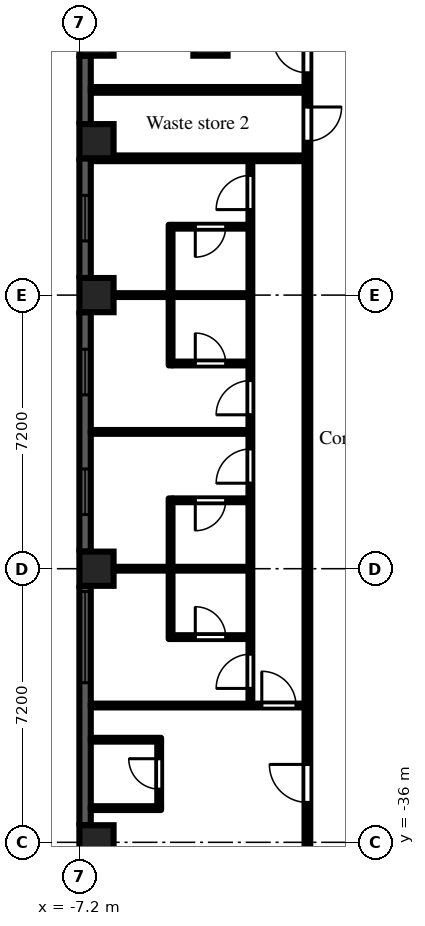
"""IFC4 building model, lengths in metres.
Left out: names, types, materials, properties, quantities, classifications, styles, units other than length and angle.
Written with IfcOpenShell. Run it as: python <this file> out.ifc"""

import sys

from ifc_helpers import new_model, si_unit, direction, frame, frame_2d, origin, origin_2d, place, context, subcontext, project, spatial, rectangle, extrude, element, fill, save


model = new_model("IFC4")
c1 = context("Model", 3, precision=1e-05, world=origin(), true_north=direction((0.0, 1.0)))
c2 = subcontext(c1, "Body", "Model", "MODEL_VIEW")
j1 = project(units=[si_unit("LENGTHUNIT", "METRE"), si_unit("PLANEANGLEUNIT", "RADIAN")], contexts=[c1])
p1 = place(None, origin())
s1 = spatial("IfcSite", under=j1, at=p1, CompositionType="ELEMENT")
p2 = place(p1, origin())
s2 = spatial("IfcBuilding", under=s1, at=p2, CompositionType="ELEMENT")
p3 = place(p2, frame((0.0, 0.0, 102.9)))
s3 = spatial("IfcBuildingStorey", under=s2, at=p3, CompositionType="ELEMENT", Elevation=102.9)
for number, where, z_axis, x_axis in (
    (1, (-6.75, -36.0, 0.0), (0.0, 0.0, 1.0), (1.0, 0.0, 0.0)),
    (2, (-6.75, -28.8, 0.0), (0.0, 0.0, 1.0), (1.0, 0.0, 0.0)),
    (3, (-6.75, -21.6, 0.0), (0.0, 0.0, 1.0), (1.0, 0.0, 0.0)),
    (4, (-6.75, -17.55, 0.0), (0.0, 0.0, 1.0), (1.0, 0.0, 0.0)),
    (5, (-6.75, -14.85, 0.0), (0.0, 0.0, 1.0), (1.0, 0.0, 0.0)),
    (6, (-3.75, -14.85, 0.0), (0.0, 0.0, 1.0), (1.0, 0.0, 0.0)),
):
    element("IfcColumn", number, at=place(p3, frame(where, z_axis=z_axis, x_axis=x_axis)), inside=s3, PredefinedType="COLUMN", context=c2, shape_type="SweptSolid", body=[
        extrude(rectangle(XDim=0.9, YDim=0.9, at=origin_2d()), origin(), (0.0, 0.0, 1.0), 3.0),
    ])
p4 = place(p3, frame((-7.05, -15.3, 0.0), z_axis=(0.0, 0.0, 1.0), x_axis=(0.0, -1.0, 0.0)))
e7 = element("IfcWall", 7, at=p4, inside=s3, PredefinedType="SOLIDWALL", context=c2, shape_type="SweptSolid", body=[
    extrude(rectangle(XDim=1.8, YDim=0.3, at=frame_2d((0.9, 0.0))), origin(), (0.0, 0.0, 1.0), 2.1),
])
p5 = place(p3, frame((-7.05, -18.0, 0.0), z_axis=(0.0, 0.0, 1.0), x_axis=(0.0, -1.0, 0.0)))
e8 = element("IfcWall", 8, at=p5, inside=s3, PredefinedType="SOLIDWALL", context=c2, shape_type="SweptSolid", body=[
    extrude(rectangle(XDim=3.15, YDim=0.3, at=frame_2d((1.575, 0.0))), origin(), (0.0, 0.0, 1.0), 2.1),
])
p6 = place(p5, frame((0.975, 0.0, 0.2)))
e9 = element("IfcOpeningElement", 9, at=p6, cuts=e8, PredefinedType="OPENING", context=c2, shape_type="SweptSolid", body=[
    extrude(rectangle(XDim=1.2, YDim=1.85, at=frame_2d((0.6, 0.925))), frame((0.0, 0.16, 0.0), z_axis=(0.0, -1.0, 0.0), x_axis=(1.0, 0.0, 0.0)), (0.0, 0.0, 1.0), 0.32),
])
p7 = place(p3, frame((-7.05, -22.05, 0.0), z_axis=(0.0, 0.0, 1.0), x_axis=(0.0, -1.0, 0.0)))
e10 = element("IfcWall", 10, at=p7, inside=s3, PredefinedType="SOLIDWALL", context=c2, shape_type="SweptSolid", body=[
    extrude(rectangle(XDim=6.3, YDim=0.3, at=frame_2d((3.15, 0.0))), origin(), (0.0, 0.0, 1.0), 2.1),
])
p8 = place(p7, frame((0.975, 0.0, 0.2)))
e11 = element("IfcOpeningElement", 11, at=p8, cuts=e10, PredefinedType="OPENING", context=c2, shape_type="SweptSolid", body=[
    extrude(rectangle(XDim=1.2, YDim=1.85, at=frame_2d((0.6, 0.925))), frame((0.0, 0.16, 0.0), z_axis=(0.0, -1.0, 0.0), x_axis=(1.0, 0.0, 0.0)), (0.0, 0.0, 1.0), 0.32),
])
p9 = place(p7, frame((4.125, 0.0, 0.2)))
e12 = element("IfcOpeningElement", 12, at=p9, cuts=e10, PredefinedType="OPENING", context=c2, shape_type="SweptSolid", body=[
    extrude(rectangle(XDim=1.2, YDim=1.85, at=frame_2d((0.6, 0.925))), frame((0.0, 0.16, 0.0), z_axis=(0.0, -1.0, 0.0), x_axis=(1.0, 0.0, 0.0)), (0.0, 0.0, 1.0), 0.32),
])
p10 = place(p3, frame((-7.05, -29.25, 0.0), z_axis=(0.0, 0.0, 1.0), x_axis=(0.0, -1.0, 0.0)))
e13 = element("IfcWall", 13, at=p10, inside=s3, PredefinedType="SOLIDWALL", context=c2, shape_type="SweptSolid", body=[
    extrude(rectangle(XDim=6.3, YDim=0.3, at=frame_2d((3.15, 0.0))), origin(), (0.0, 0.0, 1.0), 2.1),
])
p11 = place(p10, frame((0.15, 0.0, 0.2)))
e14 = element("IfcOpeningElement", 14, at=p11, cuts=e13, PredefinedType="OPENING", context=c2, shape_type="SweptSolid", body=[
    extrude(rectangle(XDim=2.4, YDim=1.85, at=frame_2d((1.2, 0.925))), frame((0.0, 0.16, 0.0), z_axis=(0.0, -1.0, 0.0), x_axis=(1.0, 0.0, 0.0)), (0.0, 0.0, 1.0), 0.32),
])
for number, where, z_axis, x_axis in (
    (15, (-6.9, -35.1, 0.0), (0.0, 0.0, 1.0), (1.0, 0.0, 0.0)),
    (16, (-6.9, -33.3, 0.0), (0.0, 0.0, 1.0), (1.0, 0.0, 0.0)),
):
    element("IfcWall", number, at=place(p3, frame(where, z_axis=z_axis, x_axis=x_axis)), inside=s3, PredefinedType="PARTITIONING", context=c2, shape_type="SweptSolid", body=[
        extrude(rectangle(XDim=1.85, YDim=0.1, at=frame_2d((0.925, 0.0))), origin(), (0.0, 0.0, 1.0), 2.575),
    ])
p12 = place(p3, frame((-6.9, -32.4, 0.0), z_axis=(0.0, 0.0, 1.0), x_axis=(1.0, 0.0, 0.0)))
e17 = element("IfcWall", 17, at=p12, inside=s3, PredefinedType="PARTITIONING", context=c2, shape_type="SweptSolid", body=[
    extrude(rectangle(XDim=5.625, YDim=0.1, at=frame_2d((2.812, 0.0))), origin(), (0.0, 0.0, 1.0), 2.575),
])
p13 = place(p12, frame((4.5, 0.0, 0.0)))
e18 = element("IfcOpeningElement", 18, at=p13, cuts=e17, PredefinedType="OPENING", context=c2, shape_type="SweptSolid", body=[
    extrude(rectangle(XDim=0.9, YDim=2.1, at=frame_2d((0.45, 1.05))), frame((0.0, 0.06, 0.0), z_axis=(0.0, -1.0, 0.0), x_axis=(1.0, 0.0, 0.0)), (0.0, 0.0, 1.0), 0.12),
])
for number, where, z_axis, x_axis in (
    (19, (-6.9, -28.8, 0.0), (0.0, 0.0, 1.0), (1.0, 0.0, 0.0)),
    (20, (-6.9, -25.2, 0.0), (0.0, 0.0, 1.0), (1.0, 0.0, 0.0)),
    (21, (-6.9, -21.6, 0.0), (0.0, 0.0, 1.0), (1.0, 0.0, 0.0)),
):
    element("IfcWall", number, at=place(p3, frame(where, z_axis=z_axis, x_axis=x_axis)), inside=s3, PredefinedType="PARTITIONING", context=c2, shape_type="SweptSolid", body=[
        extrude(rectangle(XDim=4.15, YDim=0.1, at=frame_2d((2.075, 0.0))), origin(), (0.0, 0.0, 1.0), 2.575),
    ])
for number, where, z_axis, x_axis in (
    (22, (-6.9, -18.0, 0.0), (0.0, 0.0, 1.0), (1.0, 0.0, 0.0)),
    (23, (-6.9, -16.2, 0.0), (0.0, 0.0, 1.0), (1.0, 0.0, 0.0)),
):
    element("IfcWall", number, at=place(p3, frame(where, z_axis=z_axis, x_axis=x_axis)), inside=s3, PredefinedType="PARTITIONING", context=c2, shape_type="SweptSolid", body=[
        extrude(rectangle(XDim=5.625, YDim=0.15, at=frame_2d((2.812, 0.0))), origin(), (0.0, 0.0, 1.0), 2.575),
    ])
p14 = place(p3, frame((-5.1, -35.05, 0.0), z_axis=(0.0, 0.0, 1.0), x_axis=(0.0, 1.0, 0.0)))
e24 = element("IfcWall", 24, at=p14, inside=s3, PredefinedType="PARTITIONING", context=c2, shape_type="SweptSolid", body=[
    extrude(rectangle(XDim=1.7, YDim=0.1, at=frame_2d((0.85, 0.0))), origin(), (0.0, 0.0, 1.0), 2.575),
])
p15 = place(p14, frame((0.45, 0.0, 0.0)))
e25 = element("IfcOpeningElement", 25, at=p15, cuts=e24, PredefinedType="OPENING", context=c2, shape_type="SweptSolid", body=[
    extrude(rectangle(XDim=0.8, YDim=2.1, at=frame_2d((0.4, 1.05))), frame((0.0, 0.06, 0.0), z_axis=(0.0, -1.0, 0.0), x_axis=(1.0, 0.0, 0.0)), (0.0, 0.0, 1.0), 0.12),
])
p16 = place(p3, frame((-4.8, -30.65, 0.0), z_axis=(0.0, 0.0, 1.0), x_axis=(0.0, 1.0, 0.0)))
e26 = element("IfcWall", 26, at=p16, inside=s3, PredefinedType="PARTITIONING", context=c2, shape_type="SweptSolid", body=[
    extrude(rectangle(XDim=3.7, YDim=0.1, at=frame_2d((1.85, 0.0))), origin(), (0.0, 0.0, 1.0), 2.575),
])
p17 = place(p3, frame((-4.75, -30.6, 0.0), z_axis=(0.0, 0.0, 1.0), x_axis=(1.0, 0.0, 0.0)))
e27 = element("IfcWall", 27, at=p17, inside=s3, PredefinedType="PARTITIONING", context=c2, shape_type="SweptSolid", body=[
    extrude(rectangle(XDim=2.0, YDim=0.1, at=frame_2d((1.0, 0.0))), origin(), (0.0, 0.0, 1.0), 2.575),
])
p18 = place(p17, frame((0.6, 0.0, 0.0)))
e28 = element("IfcOpeningElement", 28, at=p18, cuts=e27, PredefinedType="OPENING", context=c2, shape_type="SweptSolid", body=[
    extrude(rectangle(XDim=0.8, YDim=2.1, at=frame_2d((0.4, 1.05))), frame((0.0, 0.06, 0.0), z_axis=(0.0, -1.0, 0.0), x_axis=(1.0, 0.0, 0.0)), (0.0, 0.0, 1.0), 0.12),
])
p19 = place(p3, frame((-4.75, -27.0, 0.0), z_axis=(0.0, 0.0, 1.0), x_axis=(1.0, 0.0, 0.0)))
e29 = element("IfcWall", 29, at=p19, inside=s3, PredefinedType="PARTITIONING", context=c2, shape_type="SweptSolid", body=[
    extrude(rectangle(XDim=2.0, YDim=0.1, at=frame_2d((1.0, 0.0))), origin(), (0.0, 0.0, 1.0), 2.575),
])
p20 = place(p19, frame((0.6, 0.0, 0.0)))
e30 = element("IfcOpeningElement", 30, at=p20, cuts=e29, PredefinedType="OPENING", context=c2, shape_type="SweptSolid", body=[
    extrude(rectangle(XDim=0.8, YDim=2.1, at=frame_2d((0.4, 1.05))), frame((0.0, 0.06, 0.0), z_axis=(0.0, -1.0, 0.0), x_axis=(1.0, 0.0, 0.0)), (0.0, 0.0, 1.0), 0.12),
])
p21 = place(p3, frame((-4.8, -23.45, 0.0), z_axis=(0.0, 0.0, 1.0), x_axis=(0.0, 1.0, 0.0)))
e31 = element("IfcWall", 31, at=p21, inside=s3, PredefinedType="PARTITIONING", context=c2, shape_type="SweptSolid", body=[
    extrude(rectangle(XDim=3.7, YDim=0.1, at=frame_2d((1.85, 0.0))), origin(), (0.0, 0.0, 1.0), 2.575),
])
p22 = place(p3, frame((-4.75, -23.4, 0.0), z_axis=(0.0, 0.0, 1.0), x_axis=(1.0, 0.0, 0.0)))
e32 = element("IfcWall", 32, at=p22, inside=s3, PredefinedType="PARTITIONING", context=c2, shape_type="SweptSolid", body=[
    extrude(rectangle(XDim=2.0, YDim=0.1, at=frame_2d((1.0, 0.0))), origin(), (0.0, 0.0, 1.0), 2.575),
])
p23 = place(p22, frame((0.6, 0.0, 0.0)))
e33 = element("IfcOpeningElement", 33, at=p23, cuts=e32, PredefinedType="OPENING", context=c2, shape_type="SweptSolid", body=[
    extrude(rectangle(XDim=0.8, YDim=2.1, at=frame_2d((0.4, 1.05))), frame((0.0, 0.06, 0.0), z_axis=(0.0, -1.0, 0.0), x_axis=(1.0, 0.0, 0.0)), (0.0, 0.0, 1.0), 0.12),
])
p24 = place(p3, frame((-4.75, -19.8, 0.0), z_axis=(0.0, 0.0, 1.0), x_axis=(1.0, 0.0, 0.0)))
e34 = element("IfcWall", 34, at=p24, inside=s3, PredefinedType="PARTITIONING", context=c2, shape_type="SweptSolid", body=[
    extrude(rectangle(XDim=2.0, YDim=0.1, at=frame_2d((1.0, 0.0))), origin(), (0.0, 0.0, 1.0), 2.575),
])
p25 = place(p24, frame((0.6, 0.0, 0.0)))
e35 = element("IfcOpeningElement", 35, at=p25, cuts=e34, PredefinedType="OPENING", context=c2, shape_type="SweptSolid", body=[
    extrude(rectangle(XDim=0.8, YDim=2.1, at=frame_2d((0.4, 1.05))), frame((0.0, 0.06, 0.0), z_axis=(0.0, -1.0, 0.0), x_axis=(1.0, 0.0, 0.0)), (0.0, 0.0, 1.0), 0.12),
])
p26 = place(p3, frame((-2.7, -32.35, 0.0), z_axis=(0.0, 0.0, 1.0), x_axis=(0.0, 1.0, 0.0)))
e36 = element("IfcWall", 36, at=p26, inside=s3, PredefinedType="PARTITIONING", context=c2, shape_type="SweptSolid", body=[
    extrude(rectangle(XDim=14.275, YDim=0.1, at=frame_2d((7.138, 0.0))), origin(), (0.0, 0.0, 1.0), 2.575),
])
p27 = place(p26, frame((0.4, 0.0, 0.0)))
e37 = element("IfcOpeningElement", 37, at=p27, cuts=e36, PredefinedType="OPENING", context=c2, shape_type="SweptSolid", body=[
    extrude(rectangle(XDim=0.9, YDim=2.1, at=frame_2d((0.45, 1.05))), frame((0.0, 0.06, 0.0), z_axis=(0.0, -1.0, 0.0), x_axis=(1.0, 0.0, 0.0)), (0.0, 0.0, 1.0), 0.12),
])
p28 = place(p26, frame((5.8, 0.0, 0.0)))
e38 = element("IfcOpeningElement", 38, at=p28, cuts=e36, PredefinedType="OPENING", context=c2, shape_type="SweptSolid", body=[
    extrude(rectangle(XDim=0.9, YDim=2.1, at=frame_2d((0.45, 1.05))), frame((0.0, 0.06, 0.0), z_axis=(0.0, -1.0, 0.0), x_axis=(1.0, 0.0, 0.0)), (0.0, 0.0, 1.0), 0.12),
])
p29 = place(p26, frame((7.6, 0.0, 0.0)))
e39 = element("IfcOpeningElement", 39, at=p29, cuts=e36, PredefinedType="OPENING", context=c2, shape_type="SweptSolid", body=[
    extrude(rectangle(XDim=0.9, YDim=2.1, at=frame_2d((0.45, 1.05))), frame((0.0, 0.06, 0.0), z_axis=(0.0, -1.0, 0.0), x_axis=(1.0, 0.0, 0.0)), (0.0, 0.0, 1.0), 0.12),
])
p30 = place(p26, frame((13.0, 0.0, 0.0)))
e40 = element("IfcOpeningElement", 40, at=p30, cuts=e36, PredefinedType="OPENING", context=c2, shape_type="SweptSolid", body=[
    extrude(rectangle(XDim=0.9, YDim=2.1, at=frame_2d((0.45, 1.05))), frame((0.0, 0.06, 0.0), z_axis=(0.0, -1.0, 0.0), x_axis=(1.0, 0.0, 0.0)), (0.0, 0.0, 1.0), 0.12),
])
p31 = place(p3, frame((-1.2, -36.5, 0.0), z_axis=(0.0, 0.0, 1.0), x_axis=(0.0, 1.0, 0.0)))
e41 = element("IfcWall", 41, at=p31, inside=s3, PredefinedType="PARTITIONING", context=c2, shape_type="SweptSolid", body=[
    extrude(rectangle(XDim=35.225, YDim=0.15, at=frame_2d((17.613, 0.0))), origin(), (0.0, 0.0, 1.0), 2.575),
])
p32 = place(p31, frame((31.85, 0.0, 0.0)))
e42 = element("IfcOpeningElement", 42, at=p32, cuts=e41, PredefinedType="OPENING", context=c2, shape_type="SweptSolid", body=[
    extrude(rectangle(XDim=0.9, YDim=2.1, at=frame_2d((0.45, 1.05))), frame((0.0, 0.085, 0.0), z_axis=(0.0, -1.0, 0.0), x_axis=(1.0, 0.0, 0.0)), (0.0, 0.0, 1.0), 0.17),
])
p33 = place(p31, frame((27.05, 0.0, 0.0)))
e43 = element("IfcOpeningElement", 43, at=p33, cuts=e41, PredefinedType="OPENING", context=c2, shape_type="SweptSolid", body=[
    extrude(rectangle(XDim=0.9, YDim=2.1, at=frame_2d((0.45, 1.05))), frame((0.0, 0.085, 0.0), z_axis=(0.0, -1.0, 0.0), x_axis=(1.0, 0.0, 0.0)), (0.0, 0.0, 1.0), 0.17),
])
p34 = place(p31, frame((20.75, 0.0, 0.0)))
e44 = element("IfcOpeningElement", 44, at=p34, cuts=e41, PredefinedType="OPENING", context=c2, shape_type="SweptSolid", body=[
    extrude(rectangle(XDim=0.9, YDim=2.1, at=frame_2d((0.45, 1.05))), frame((0.0, 0.085, 0.0), z_axis=(0.0, -1.0, 0.0), x_axis=(1.0, 0.0, 0.0)), (0.0, 0.0, 1.0), 0.17),
])
p35 = place(p31, frame((18.95, 0.0, 0.0)))
e45 = element("IfcOpeningElement", 45, at=p35, cuts=e41, PredefinedType="OPENING", context=c2, shape_type="SweptSolid", body=[
    extrude(rectangle(XDim=0.9, YDim=2.1, at=frame_2d((0.45, 1.05))), frame((0.0, 0.085, 0.0), z_axis=(0.0, -1.0, 0.0), x_axis=(1.0, 0.0, 0.0)), (0.0, 0.0, 1.0), 0.17),
])
p36 = place(p31, frame((1.55, 0.0, 0.0)))
e46 = element("IfcOpeningElement", 46, at=p36, cuts=e41, PredefinedType="OPENING", context=c2, shape_type="SweptSolid", body=[
    extrude(rectangle(XDim=1.0, YDim=2.1, at=frame_2d((0.5, 1.05))), frame((0.0, 0.085, 0.0), z_axis=(0.0, -1.0, 0.0), x_axis=(1.0, 0.0, 0.0)), (0.0, 0.0, 1.0), 0.17),
])
p37 = place(p6, origin())
e47 = element("IfcWindow", 47, at=p37, inside=s3, PartitioningType="SINGLE_PANEL", PredefinedType="WINDOW", context=c2, shape_type="SweptSolid", body=[
    extrude(rectangle(XDim=1.2, YDim=1.85, at=frame_2d((0.6, 0.925))), frame((0.0, 0.03, 0.0), z_axis=(0.0, -1.0, 0.0), x_axis=(1.0, 0.0, 0.0)), (0.0, 0.0, 1.0), 0.06),
])
fill(e9, e47)
p38 = place(p8, origin())
e48 = element("IfcWindow", 48, at=p38, inside=s3, PartitioningType="SINGLE_PANEL", PredefinedType="WINDOW", context=c2, shape_type="SweptSolid", body=[
    extrude(rectangle(XDim=1.2, YDim=1.85, at=frame_2d((0.6, 0.925))), frame((0.0, 0.03, 0.0), z_axis=(0.0, -1.0, 0.0), x_axis=(1.0, 0.0, 0.0)), (0.0, 0.0, 1.0), 0.06),
])
fill(e11, e48)
p39 = place(p9, origin())
e49 = element("IfcWindow", 49, at=p39, inside=s3, PartitioningType="SINGLE_PANEL", PredefinedType="WINDOW", context=c2, shape_type="SweptSolid", body=[
    extrude(rectangle(XDim=1.2, YDim=1.85, at=frame_2d((0.6, 0.925))), frame((0.0, 0.03, 0.0), z_axis=(0.0, -1.0, 0.0), x_axis=(1.0, 0.0, 0.0)), (0.0, 0.0, 1.0), 0.06),
])
fill(e12, e49)
p40 = place(p11, origin())
e50 = element("IfcWindow", 50, at=p40, inside=s3, PartitioningType="SINGLE_PANEL", PredefinedType="WINDOW", context=c2, shape_type="SweptSolid", body=[
    extrude(rectangle(XDim=2.4, YDim=1.85, at=frame_2d((1.2, 0.925))), frame((0.0, 0.03, 0.0), z_axis=(0.0, -1.0, 0.0), x_axis=(1.0, 0.0, 0.0)), (0.0, 0.0, 1.0), 0.06),
])
fill(e14, e50)
p41 = place(p34, origin())
e51 = element("IfcDoor", 51, at=p41, inside=s3, OperationType="SINGLE_SWING_RIGHT", PredefinedType="DOOR", context=c2, shape_type="SweptSolid", body=[
    extrude(rectangle(XDim=0.9, YDim=2.1, at=frame_2d((0.45, 1.05))), frame((0.0, 0.025, 0.0), z_axis=(0.0, -1.0, 0.0), x_axis=(1.0, 0.0, 0.0)), (0.0, 0.0, 1.0), 0.05),
])
fill(e44, e51)
p42 = place(p35, frame((0.9, 0.0, 0.0), z_axis=(0.0, 0.0, 1.0), x_axis=(-1.0, 0.0, 0.0)))
e52 = element("IfcDoor", 52, at=p42, inside=s3, OperationType="SINGLE_SWING_LEFT", PredefinedType="DOOR", context=c2, shape_type="SweptSolid", body=[
    extrude(rectangle(XDim=0.9, YDim=2.1, at=frame_2d((0.45, 1.05))), frame((0.0, 0.025, 0.0), z_axis=(0.0, -1.0, 0.0), x_axis=(1.0, 0.0, 0.0)), (0.0, 0.0, 1.0), 0.05),
])
fill(e45, e52)
p43 = place(p15, origin())
e53 = element("IfcDoor", 53, at=p43, inside=s3, OperationType="SINGLE_SWING_RIGHT", PredefinedType="DOOR", context=c2, shape_type="SweptSolid", body=[
    extrude(rectangle(XDim=0.8, YDim=2.1, at=frame_2d((0.4, 1.05))), frame((0.0, 0.025, 0.0), z_axis=(0.0, -1.0, 0.0), x_axis=(1.0, 0.0, 0.0)), (0.0, 0.0, 1.0), 0.05),
])
fill(e25, e53)
p44 = place(p36, origin())
e54 = element("IfcDoor", 54, at=p44, inside=s3, OperationType="SINGLE_SWING_RIGHT", PredefinedType="DOOR", context=c2, shape_type="SweptSolid", body=[
    extrude(rectangle(XDim=1.0, YDim=2.1, at=frame_2d((0.5, 1.05))), frame((0.0, 0.025, 0.0), z_axis=(0.0, -1.0, 0.0), x_axis=(1.0, 0.0, 0.0)), (0.0, 0.0, 1.0), 0.05),
])
fill(e46, e54)
p45 = place(p27, origin())
e55 = element("IfcDoor", 55, at=p45, inside=s3, OperationType="SINGLE_SWING_LEFT", PredefinedType="DOOR", context=c2, shape_type="SweptSolid", body=[
    extrude(rectangle(XDim=0.9, YDim=2.1, at=frame_2d((0.45, 1.05))), frame((0.0, 0.025, 0.0), z_axis=(0.0, -1.0, 0.0), x_axis=(1.0, 0.0, 0.0)), (0.0, 0.0, 1.0), 0.05),
])
fill(e37, e55)
p46 = place(p28, origin())
e56 = element("IfcDoor", 56, at=p46, inside=s3, OperationType="SINGLE_SWING_LEFT", PredefinedType="DOOR", context=c2, shape_type="SweptSolid", body=[
    extrude(rectangle(XDim=0.9, YDim=2.1, at=frame_2d((0.45, 1.05))), frame((0.0, 0.025, 0.0), z_axis=(0.0, -1.0, 0.0), x_axis=(1.0, 0.0, 0.0)), (0.0, 0.0, 1.0), 0.05),
])
fill(e38, e56)
p47 = place(p29, origin())
e57 = element("IfcDoor", 57, at=p47, inside=s3, OperationType="SINGLE_SWING_LEFT", PredefinedType="DOOR", context=c2, shape_type="SweptSolid", body=[
    extrude(rectangle(XDim=0.9, YDim=2.1, at=frame_2d((0.45, 1.05))), frame((0.0, 0.025, 0.0), z_axis=(0.0, -1.0, 0.0), x_axis=(1.0, 0.0, 0.0)), (0.0, 0.0, 1.0), 0.05),
])
fill(e39, e57)
p48 = place(p30, origin())
e58 = element("IfcDoor", 58, at=p48, inside=s3, OperationType="SINGLE_SWING_LEFT", PredefinedType="DOOR", context=c2, shape_type="SweptSolid", body=[
    extrude(rectangle(XDim=0.9, YDim=2.1, at=frame_2d((0.45, 1.05))), frame((0.0, 0.025, 0.0), z_axis=(0.0, -1.0, 0.0), x_axis=(1.0, 0.0, 0.0)), (0.0, 0.0, 1.0), 0.05),
])
fill(e40, e58)
p49 = place(p13, origin())
e59 = element("IfcDoor", 59, at=p49, inside=s3, OperationType="SINGLE_SWING_LEFT", PredefinedType="DOOR", context=c2, shape_type="SweptSolid", body=[
    extrude(rectangle(XDim=0.9, YDim=2.1, at=frame_2d((0.45, 1.05))), frame((0.0, 0.025, 0.0), z_axis=(0.0, -1.0, 0.0), x_axis=(1.0, 0.0, 0.0)), (0.0, 0.0, 1.0), 0.05),
])
fill(e18, e59)
p50 = place(p25, frame((0.8, 0.0, 0.0), z_axis=(0.0, 0.0, 1.0), x_axis=(-1.0, 0.0, 0.0)))
e60 = element("IfcDoor", 60, at=p50, inside=s3, OperationType="SINGLE_SWING_RIGHT", PredefinedType="DOOR", context=c2, shape_type="SweptSolid", body=[
    extrude(rectangle(XDim=0.8, YDim=2.1, at=frame_2d((0.4, 1.05))), frame((0.0, 0.025, 0.0), z_axis=(0.0, -1.0, 0.0), x_axis=(1.0, 0.0, 0.0)), (0.0, 0.0, 1.0), 0.05),
])
fill(e35, e60)
p51 = place(p23, origin())
e61 = element("IfcDoor", 61, at=p51, inside=s3, OperationType="SINGLE_SWING_LEFT", PredefinedType="DOOR", context=c2, shape_type="SweptSolid", body=[
    extrude(rectangle(XDim=0.8, YDim=2.1, at=frame_2d((0.4, 1.05))), frame((0.0, 0.025, 0.0), z_axis=(0.0, -1.0, 0.0), x_axis=(1.0, 0.0, 0.0)), (0.0, 0.0, 1.0), 0.05),
])
fill(e33, e61)
p52 = place(p20, frame((0.8, 0.0, 0.0), z_axis=(0.0, 0.0, 1.0), x_axis=(-1.0, 0.0, 0.0)))
e62 = element("IfcDoor", 62, at=p52, inside=s3, OperationType="SINGLE_SWING_RIGHT", PredefinedType="DOOR", context=c2, shape_type="SweptSolid", body=[
    extrude(rectangle(XDim=0.8, YDim=2.1, at=frame_2d((0.4, 1.05))), frame((0.0, 0.025, 0.0), z_axis=(0.0, -1.0, 0.0), x_axis=(1.0, 0.0, 0.0)), (0.0, 0.0, 1.0), 0.05),
])
fill(e30, e62)
p53 = place(p18, origin())
e63 = element("IfcDoor", 63, at=p53, inside=s3, OperationType="SINGLE_SWING_LEFT", PredefinedType="DOOR", context=c2, shape_type="SweptSolid", body=[
    extrude(rectangle(XDim=0.8, YDim=2.1, at=frame_2d((0.4, 1.05))), frame((0.0, 0.025, 0.0), z_axis=(0.0, -1.0, 0.0), x_axis=(1.0, 0.0, 0.0)), (0.0, 0.0, 1.0), 0.05),
])
fill(e28, e63)
save(model, sys.argv[1])
